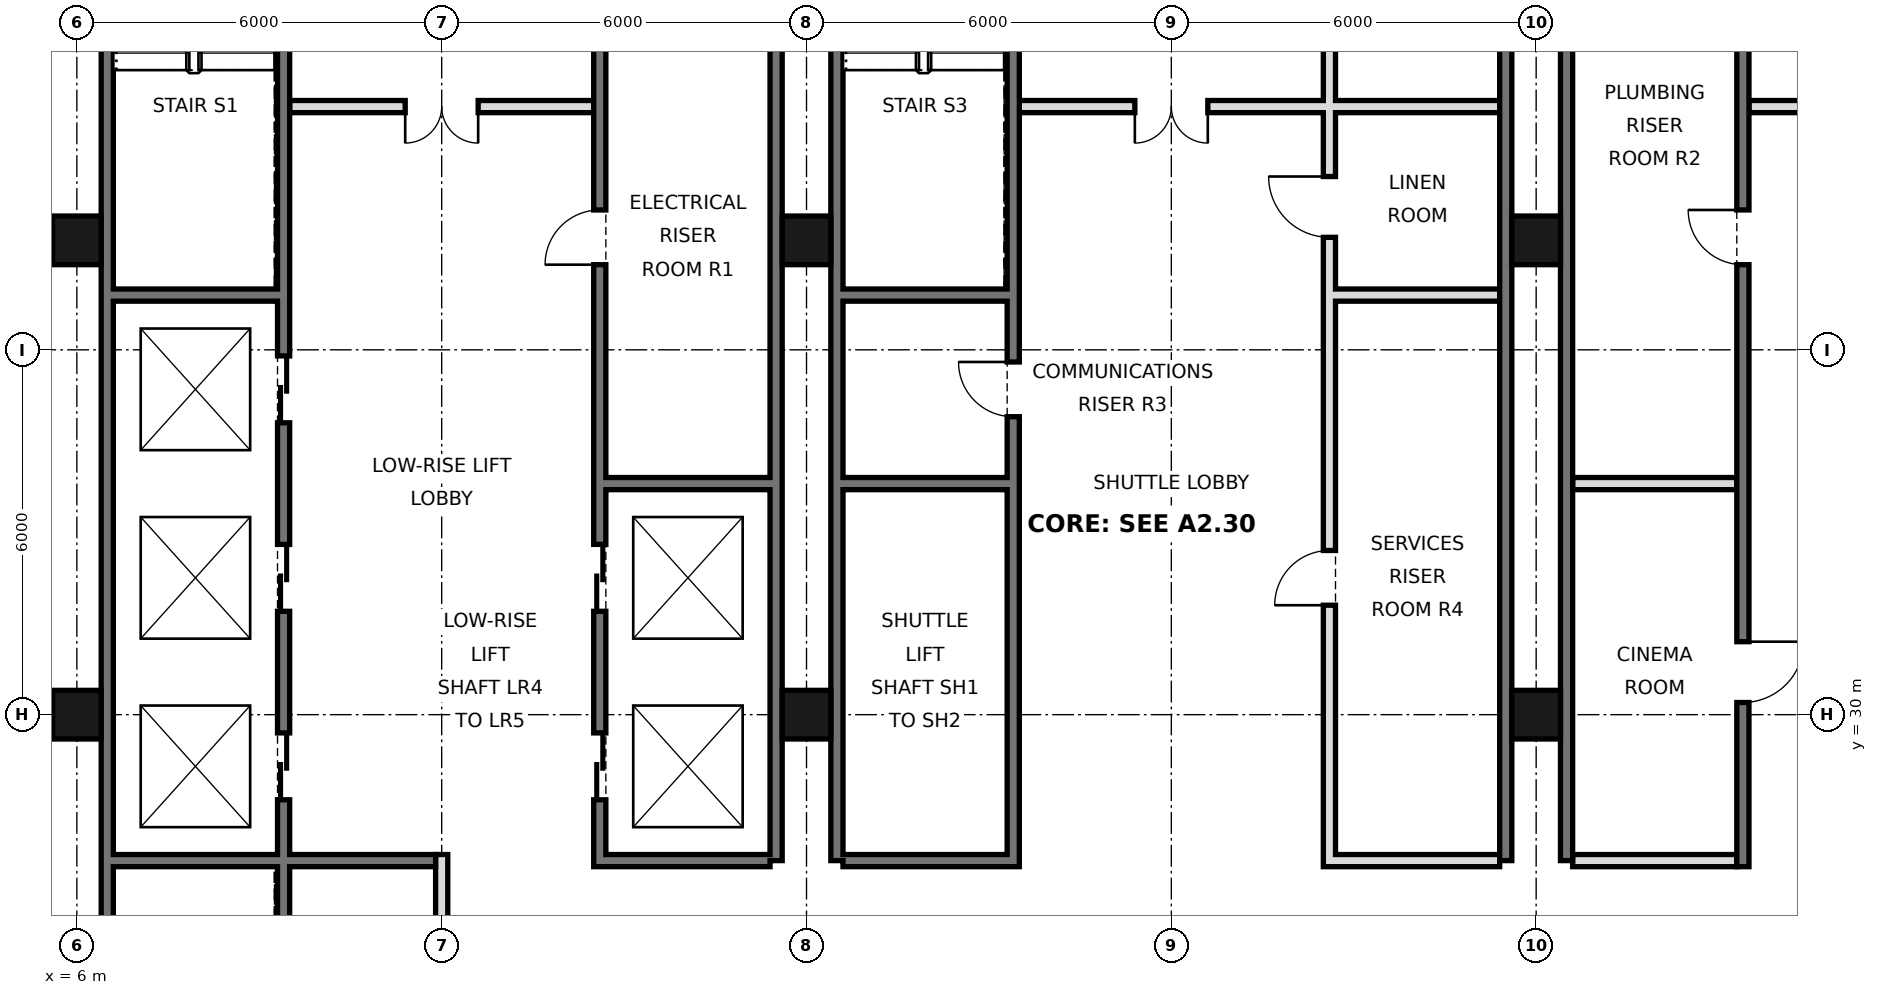
"""IFC4 building model, lengths in metres.
Left out: names, types, materials, properties, quantities, classifications, styles, units other than length and angle.
Written with IfcOpenShell. Run it as: python <this file> out.ifc"""

import sys

from ifc_helpers import new_model, si_unit, direction, frame, frame_2d, origin, origin_2d, place, context, subcontext, project, spatial, rectangle, hollow_rectangle, extrude, element, fill, save


model = new_model("IFC4")
c1 = context("Model", 3, precision=1e-05, world=origin(), true_north=direction((0.0, 1.0)))
c2 = subcontext(c1, "Body", "Model", "MODEL_VIEW")
j1 = project(units=[si_unit("LENGTHUNIT", "METRE"), si_unit("PLANEANGLEUNIT", "RADIAN")], contexts=[c1])
p1 = place(None, origin())
s1 = spatial("IfcSite", under=j1, at=p1, CompositionType="ELEMENT")
p2 = place(p1, origin())
s2 = spatial("IfcBuilding", under=s1, at=p2, CompositionType="ELEMENT")
p3 = place(p2, frame((0.0, 0.0, 119.6)))
s3 = spatial("IfcBuildingStorey", under=s2, at=p3, CompositionType="ELEMENT", Elevation=119.6)
for number, where, z_axis, x_axis in (
    (1, (6.0, 30.0, 0.0), (0.0, 0.0, 1.0), (1.0, 0.0, 0.0)),
    (2, (6.0, 37.8, 0.0), (0.0, 0.0, 1.0), (1.0, 0.0, 0.0)),
    (3, (18.0, 30.0, 0.0), (0.0, 0.0, 1.0), (1.0, 0.0, 0.0)),
    (4, (18.0, 37.8, 0.0), (0.0, 0.0, 1.0), (1.0, 0.0, 0.0)),
    (5, (30.0, 30.0, 0.0), (0.0, 0.0, 1.0), (1.0, 0.0, 0.0)),
    (6, (30.0, 37.8, 0.0), (0.0, 0.0, 1.0), (1.0, 0.0, 0.0)),
):
    element("IfcColumn", number, at=place(p3, frame(where, z_axis=z_axis, x_axis=x_axis)), inside=s3, PredefinedType="COLUMN", context=c2, shape_type="SweptSolid", body=[
        extrude(hollow_rectangle(XDim=0.8, YDim=0.8, WallThickness=0.05, at=origin_2d()), origin(), (0.0, 0.0, 1.0), 3.6),
    ])
p4 = place(p3, frame((6.5, 21.6, 0.0), z_axis=(0.0, 0.0, 1.0), x_axis=(0.0, 1.0, 0.0)))
e7 = element("IfcWall", 7, at=p4, inside=s3, PredefinedType="SOLIDWALL", context=c2, shape_type="SweptSolid", body=[
    extrude(rectangle(XDim=23.5, YDim=0.2, at=frame_2d((11.75, 0.0))), origin(), (0.0, 0.0, 1.0), 3.42),
])
for number, where, z_axis, x_axis in (
    (8, (17.5, 27.6, 0.0), (0.0, 0.0, 1.0), (0.0, 1.0, 0.0)),
    (9, (18.5, 27.6, 0.0), (0.0, 0.0, 1.0), (0.0, 1.0, 0.0)),
    (10, (29.5, 27.6, 0.0), (0.0, 0.0, 1.0), (0.0, 1.0, 0.0)),
    (11, (30.5, 27.6, 0.0), (0.0, 0.0, 1.0), (0.0, 1.0, 0.0)),
):
    element("IfcWall", number, at=place(p3, frame(where, z_axis=z_axis, x_axis=x_axis)), inside=s3, PredefinedType="SOLIDWALL", context=c2, shape_type="SweptSolid", body=[
        extrude(rectangle(XDim=17.5, YDim=0.2, at=frame_2d((8.75, 0.0))), origin(), (0.0, 0.0, 1.0), 3.42),
    ])
p5 = place(p3, frame((12.0, 21.6, 0.0), z_axis=(0.0, 0.0, 1.0), x_axis=(0.0, 1.0, 0.0)))
e12 = element("IfcWall", 12, at=p5, inside=s3, PredefinedType="PARTITIONING", context=c2, shape_type="SweptSolid", body=[
    extrude(rectangle(XDim=6.1, YDim=0.2, at=frame_2d((3.05, 0.0))), origin(), (0.0, 0.0, 1.0), 3.42),
])
p6 = place(p3, frame((14.6, 27.5, 0.0), z_axis=(0.0, 0.0, 1.0), x_axis=(0.0, 1.0, 0.0)))
e13 = element("IfcWall", 13, at=p6, inside=s3, PredefinedType="SOLIDWALL", context=c2, shape_type="SweptSolid", body=[
    extrude(rectangle(XDim=17.5, YDim=0.2, at=frame_2d((8.75, 0.0))), origin(), (0.0, 0.0, 1.0), 3.42),
])
p7 = place(p6, frame((1.1, 0.0, 0.0)))
e14 = element("IfcOpeningElement", 14, at=p7, cuts=e13, PredefinedType="OPENING", context=c2, shape_type="SweptSolid", body=[
    extrude(rectangle(XDim=1.1, YDim=2.1, at=frame_2d((0.55, 1.05))), frame((0.0, 0.11, 0.0), z_axis=(0.0, -1.0, 0.0), x_axis=(1.0, 0.0, 0.0)), (0.0, 0.0, 1.0), 0.22),
])
p8 = place(p6, frame((4.2, 0.0, 0.0)))
e15 = element("IfcOpeningElement", 15, at=p8, cuts=e13, PredefinedType="OPENING", context=c2, shape_type="SweptSolid", body=[
    extrude(rectangle(XDim=1.1, YDim=2.1, at=frame_2d((0.55, 1.05))), frame((0.0, 0.11, 0.0), z_axis=(0.0, -1.0, 0.0), x_axis=(1.0, 0.0, 0.0)), (0.0, 0.0, 1.0), 0.22),
])
p9 = place(p6, frame((15.4, 0.0, 0.0)))
e16 = element("IfcOpeningElement", 16, at=p9, cuts=e13, PredefinedType="OPENING", context=c2, shape_type="SweptSolid", body=[
    extrude(rectangle(XDim=1.1, YDim=2.1, at=frame_2d((0.55, 1.05))), frame((0.0, 0.11, 0.0), z_axis=(0.0, -1.0, 0.0), x_axis=(1.0, 0.0, 0.0)), (0.0, 0.0, 1.0), 0.22),
])
p10 = place(p6, frame((9.9, 0.0, 0.0)))
e17 = element("IfcOpeningElement", 17, at=p10, cuts=e13, PredefinedType="OPENING", context=c2, shape_type="SweptSolid", body=[
    extrude(rectangle(XDim=0.9, YDim=2.1, at=frame_2d((0.45, 1.05))), frame((0.0, 0.11, 0.0), z_axis=(0.0, -1.0, 0.0), x_axis=(1.0, 0.0, 0.0)), (0.0, 0.0, 1.0), 0.22),
])
p11 = place(p3, frame((21.4, 27.5, 0.0), z_axis=(0.0, 0.0, 1.0), x_axis=(0.0, 1.0, 0.0)))
e18 = element("IfcWall", 18, at=p11, inside=s3, PredefinedType="SOLIDWALL", context=c2, shape_type="SweptSolid", body=[
    extrude(rectangle(XDim=17.5, YDim=0.2, at=frame_2d((8.75, 0.0))), origin(), (0.0, 0.0, 1.0), 3.42),
])
p12 = place(p11, frame((16.2, 0.0, 0.0)))
e19 = element("IfcOpeningElement", 19, at=p12, cuts=e18, PredefinedType="OPENING", context=c2, shape_type="SweptSolid", body=[
    extrude(rectangle(XDim=1.0, YDim=2.1, at=frame_2d((0.5, 1.05))), frame((0.0, 0.11, 0.0), z_axis=(0.0, -1.0, 0.0), x_axis=(1.0, 0.0, 0.0)), (0.0, 0.0, 1.0), 0.22),
])
p13 = place(p11, frame((7.4, 0.0, 0.0)))
e20 = element("IfcOpeningElement", 20, at=p13, cuts=e18, PredefinedType="OPENING", context=c2, shape_type="SweptSolid", body=[
    extrude(rectangle(XDim=0.9, YDim=2.1, at=frame_2d((0.45, 1.05))), frame((0.0, 0.11, 0.0), z_axis=(0.0, -1.0, 0.0), x_axis=(1.0, 0.0, 0.0)), (0.0, 0.0, 1.0), 0.22),
])
p14 = place(p3, frame((26.6, 27.5, 0.0), z_axis=(0.0, 0.0, 1.0), x_axis=(0.0, 1.0, 0.0)))
e21 = element("IfcWall", 21, at=p14, inside=s3, PredefinedType="SOLIDWALL", context=c2, shape_type="SweptSolid", body=[
    extrude(rectangle(XDim=17.5, YDim=0.2, at=frame_2d((8.75, 0.0))), origin(), (0.0, 0.0, 1.0), 3.42),
])
p15 = place(p14, frame((4.3, 0.0, 0.0)))
e22 = element("IfcOpeningElement", 22, at=p15, cuts=e21, PredefinedType="OPENING", context=c2, shape_type="SweptSolid", body=[
    extrude(rectangle(XDim=0.9, YDim=2.1, at=frame_2d((0.45, 1.05))), frame((0.0, 0.11, 0.0), z_axis=(0.0, -1.0, 0.0), x_axis=(1.0, 0.0, 0.0)), (0.0, 0.0, 1.0), 0.22),
])
p16 = place(p14, frame((10.35, 0.0, 0.0)))
e23 = element("IfcOpeningElement", 23, at=p16, cuts=e21, PredefinedType="OPENING", context=c2, shape_type="SweptSolid", body=[
    extrude(rectangle(XDim=1.0, YDim=2.1, at=frame_2d((0.5, 1.05))), frame((0.0, 0.11, 0.0), z_axis=(0.0, -1.0, 0.0), x_axis=(1.0, 0.0, 0.0)), (0.0, 0.0, 1.0), 0.22),
])
p17 = place(p14, frame((14.575, 0.0, 0.0)))
e24 = element("IfcOpeningElement", 24, at=p17, cuts=e21, PredefinedType="OPENING", context=c2, shape_type="SweptSolid", body=[
    extrude(rectangle(XDim=1.0, YDim=2.1, at=frame_2d((0.5, 1.05))), frame((0.0, 0.11, 0.0), z_axis=(0.0, -1.0, 0.0), x_axis=(1.0, 0.0, 0.0)), (0.0, 0.0, 1.0), 0.22),
])
p18 = place(p3, frame((33.4, 27.5, 0.0), z_axis=(0.0, 0.0, 1.0), x_axis=(0.0, 1.0, 0.0)))
e25 = element("IfcWall", 25, at=p18, inside=s3, PredefinedType="SOLIDWALL", context=c2, shape_type="SweptSolid", body=[
    extrude(rectangle(XDim=17.5, YDim=0.2, at=frame_2d((8.75, 0.0))), origin(), (0.0, 0.0, 1.0), 3.42),
])
p19 = place(p18, frame((15.4, 0.0, 0.0)))
e26 = element("IfcOpeningElement", 26, at=p19, cuts=e25, PredefinedType="OPENING", context=c2, shape_type="SweptSolid", body=[
    extrude(rectangle(XDim=1.1, YDim=2.1, at=frame_2d((0.55, 1.05))), frame((0.0, 0.11, 0.0), z_axis=(0.0, -1.0, 0.0), x_axis=(1.0, 0.0, 0.0)), (0.0, 0.0, 1.0), 0.22),
])
p20 = place(p18, frame((2.7, 0.0, 0.0)))
e27 = element("IfcOpeningElement", 27, at=p20, cuts=e25, PredefinedType="OPENING", context=c2, shape_type="SweptSolid", body=[
    extrude(rectangle(XDim=1.0, YDim=2.1, at=frame_2d((0.5, 1.05))), frame((0.0, 0.11, 0.0), z_axis=(0.0, -1.0, 0.0), x_axis=(1.0, 0.0, 0.0)), (0.0, 0.0, 1.0), 0.22),
])
p21 = place(p18, frame((9.9, 0.0, 0.0)))
e28 = element("IfcOpeningElement", 28, at=p21, cuts=e25, PredefinedType="OPENING", context=c2, shape_type="SweptSolid", body=[
    extrude(rectangle(XDim=0.9, YDim=2.1, at=frame_2d((0.45, 1.05))), frame((0.0, 0.11, 0.0), z_axis=(0.0, -1.0, 0.0), x_axis=(1.0, 0.0, 0.0)), (0.0, 0.0, 1.0), 0.22),
])
p22 = place(p3, frame((9.4, 21.6, 0.0), z_axis=(0.0, 0.0, 1.0), x_axis=(0.0, 1.0, 0.0)))
e29 = element("IfcWall", 29, at=p22, inside=s3, PredefinedType="SOLIDWALL", context=c2, shape_type="SweptSolid", body=[
    extrude(rectangle(XDim=23.4, YDim=0.2, at=frame_2d((11.7, 0.0))), origin(), (0.0, 0.0, 1.0), 3.42),
])
p23 = place(p22, frame((7.0, 0.0, 0.0)))
e30 = element("IfcOpeningElement", 30, at=p23, cuts=e29, PredefinedType="OPENING", context=c2, shape_type="SweptSolid", body=[
    extrude(rectangle(XDim=1.1, YDim=2.1, at=frame_2d((0.55, 1.05))), frame((0.0, 0.11, 0.0), z_axis=(0.0, -1.0, 0.0), x_axis=(1.0, 0.0, 0.0)), (0.0, 0.0, 1.0), 0.22),
])
p24 = place(p22, frame((10.1, 0.0, 0.0)))
e31 = element("IfcOpeningElement", 31, at=p24, cuts=e29, PredefinedType="OPENING", context=c2, shape_type="SweptSolid", body=[
    extrude(rectangle(XDim=1.1, YDim=2.1, at=frame_2d((0.55, 1.05))), frame((0.0, 0.11, 0.0), z_axis=(0.0, -1.0, 0.0), x_axis=(1.0, 0.0, 0.0)), (0.0, 0.0, 1.0), 0.22),
])
p25 = place(p22, frame((13.2, 0.0, 0.0)))
e32 = element("IfcOpeningElement", 32, at=p25, cuts=e29, PredefinedType="OPENING", context=c2, shape_type="SweptSolid", body=[
    extrude(rectangle(XDim=1.1, YDim=2.1, at=frame_2d((0.55, 1.05))), frame((0.0, 0.11, 0.0), z_axis=(0.0, -1.0, 0.0), x_axis=(1.0, 0.0, 0.0)), (0.0, 0.0, 1.0), 0.22),
])
p26 = place(p22, frame((22.1, 0.0, 0.0)))
e33 = element("IfcOpeningElement", 33, at=p26, cuts=e29, PredefinedType="OPENING", context=c2, shape_type="SweptSolid", body=[
    extrude(rectangle(XDim=1.0, YDim=2.1, at=frame_2d((0.5, 1.05))), frame((0.0, 0.11, 0.0), z_axis=(0.0, -1.0, 0.0), x_axis=(1.0, 0.0, 0.0)), (0.0, 0.0, 1.0), 0.22),
])
p27 = place(p22, frame((0.175, 0.0, 0.0)))
e34 = element("IfcOpeningElement", 34, at=p27, cuts=e29, PredefinedType="OPENING", context=c2, shape_type="SweptSolid", body=[
    extrude(rectangle(XDim=0.9, YDim=2.1, at=frame_2d((0.45, 1.05))), frame((0.0, 0.11, 0.0), z_axis=(0.0, -1.0, 0.0), x_axis=(1.0, 0.0, 0.0)), (0.0, 0.0, 1.0), 0.22),
])
for number, where, z_axis, x_axis in (
    (35, (14.7, 27.6, 0.0), (0.0, 0.0, 1.0), (1.0, 0.0, 0.0)),
    (36, (18.6, 27.6, 0.0), (0.0, 0.0, 1.0), (1.0, 0.0, 0.0)),
    (37, (26.7, 27.6, 0.0), (0.0, 0.0, 1.0), (1.0, 0.0, 0.0)),
):
    element("IfcWall", number, at=place(p3, frame(where, z_axis=z_axis, x_axis=x_axis)), inside=s3, PredefinedType="SOLIDWALL", context=c2, shape_type="SweptSolid", body=[
        extrude(rectangle(XDim=2.7, YDim=0.2, at=frame_2d((1.35, 0.0))), origin(), (0.0, 0.0, 1.0), 3.42),
    ])
p28 = place(p3, frame((30.6, 27.6, 0.0), z_axis=(0.0, 0.0, 1.0), x_axis=(1.0, 0.0, 0.0)))
e38 = element("IfcWall", 38, at=p28, inside=s3, PredefinedType="PARTITIONING", context=c2, shape_type="SweptSolid", body=[
    extrude(rectangle(XDim=2.7, YDim=0.2, at=frame_2d((1.35, 0.0))), origin(), (0.0, 0.0, 1.0), 3.42),
])
p29 = place(p3, frame((6.6, 27.6, 0.0), z_axis=(0.0, 0.0, 1.0), x_axis=(1.0, 0.0, 0.0)))
e39 = element("IfcWall", 39, at=p29, inside=s3, PredefinedType="SOLIDWALL", context=c2, shape_type="SweptSolid", body=[
    extrude(rectangle(XDim=5.3, YDim=0.2, at=frame_2d((2.65, 0.0))), origin(), (0.0, 0.0, 1.0), 3.42),
])
for number, where, z_axis, x_axis in (
    (40, (14.7, 33.8, 0.0), (0.0, 0.0, 1.0), (1.0, 0.0, 0.0)),
    (41, (18.6, 33.8, 0.0), (0.0, 0.0, 1.0), (1.0, 0.0, 0.0)),
    (42, (30.6, 33.8, 0.0), (0.0, 0.0, 1.0), (1.0, 0.0, 0.0)),
    (43, (18.6, 36.9, 0.0), (0.0, 0.0, 1.0), (1.0, 0.0, 0.0)),
    (44, (26.7, 36.9, 0.0), (0.0, 0.0, 1.0), (1.0, 0.0, 0.0)),
    (45, (6.6, 36.9, 0.0), (0.0, 0.0, 1.0), (1.0, 0.0, 0.0)),
):
    element("IfcWall", number, at=place(p3, frame(where, z_axis=z_axis, x_axis=x_axis)), inside=s3, PredefinedType="SOLIDWALL", context=c2, shape_type="SweptSolid", body=[
        extrude(rectangle(XDim=2.7, YDim=0.2, at=frame_2d((1.35, 0.0))), origin(), (0.0, 0.0, 1.0), 3.42),
    ])
p30 = place(p3, frame((21.5, 40.0, 0.0), z_axis=(0.0, 0.0, 1.0), x_axis=(1.0, 0.0, 0.0)))
e46 = element("IfcWall", 46, at=p30, inside=s3, PredefinedType="PARTITIONING", context=c2, shape_type="SweptSolid", body=[
    extrude(rectangle(XDim=7.9, YDim=0.2, at=frame_2d((3.95, 0.0))), origin(), (0.0, 0.0, 1.0), 3.42),
])
p31 = place(p30, frame((1.9, 0.0, 0.0)))
e47 = element("IfcOpeningElement", 47, at=p31, cuts=e46, PredefinedType="OPENING", context=c2, shape_type="SweptSolid", body=[
    extrude(rectangle(XDim=1.2, YDim=2.1, at=frame_2d((0.6, 1.05))), frame((0.0, 0.11, 0.0), z_axis=(0.0, -1.0, 0.0), x_axis=(1.0, 0.0, 0.0)), (0.0, 0.0, 1.0), 0.22),
])
p32 = place(p3, frame((33.5, 40.0, 0.0), z_axis=(0.0, 0.0, 1.0), x_axis=(1.0, 0.0, 0.0)))
e48 = element("IfcWall", 48, at=p32, inside=s3, PredefinedType="PARTITIONING", context=c2, shape_type="SweptSolid", body=[
    extrude(rectangle(XDim=5.0, YDim=0.2, at=frame_2d((2.5, 0.0))), origin(), (0.0, 0.0, 1.0), 3.42),
])
p33 = place(p32, frame((1.9, 0.0, 0.0)))
e49 = element("IfcOpeningElement", 49, at=p33, cuts=e48, PredefinedType="OPENING", context=c2, shape_type="SweptSolid", body=[
    extrude(rectangle(XDim=1.2, YDim=2.1, at=frame_2d((0.6, 1.05))), frame((0.0, 0.11, 0.0), z_axis=(0.0, -1.0, 0.0), x_axis=(1.0, 0.0, 0.0)), (0.0, 0.0, 1.0), 0.22),
])
p34 = place(p3, frame((9.5, 40.0, 0.0), z_axis=(0.0, 0.0, 1.0), x_axis=(1.0, 0.0, 0.0)))
e50 = element("IfcWall", 50, at=p34, inside=s3, PredefinedType="PARTITIONING", context=c2, shape_type="SweptSolid", body=[
    extrude(rectangle(XDim=5.0, YDim=0.2, at=frame_2d((2.5, 0.0))), origin(), (0.0, 0.0, 1.0), 3.42),
])
p35 = place(p34, frame((1.9, 0.0, 0.0)))
e51 = element("IfcOpeningElement", 51, at=p35, cuts=e50, PredefinedType="OPENING", context=c2, shape_type="SweptSolid", body=[
    extrude(rectangle(XDim=1.2, YDim=2.1, at=frame_2d((0.6, 1.05))), frame((0.0, 0.11, 0.0), z_axis=(0.0, -1.0, 0.0), x_axis=(1.0, 0.0, 0.0)), (0.0, 0.0, 1.0), 0.22),
])
p36 = place(p35, frame((1.2, 0.0, 0.0), z_axis=(0.0, 0.0, 1.0), x_axis=(-1.0, 0.0, 0.0)))
e52 = element("IfcDoor", 52, at=p36, inside=s3, OperationType="DOUBLE_DOOR_SINGLE_SWING", PredefinedType="DOOR", context=c2, shape_type="SweptSolid", body=[
    extrude(rectangle(XDim=1.2, YDim=2.1, at=frame_2d((0.6, 1.05))), frame((0.0, 0.025, 0.0), z_axis=(0.0, -1.0, 0.0), x_axis=(1.0, 0.0, 0.0)), (0.0, 0.0, 1.0), 0.05),
])
fill(e51, e52)
p37 = place(p31, frame((1.2, 0.0, 0.0), z_axis=(0.0, 0.0, 1.0), x_axis=(-1.0, 0.0, 0.0)))
e53 = element("IfcDoor", 53, at=p37, inside=s3, OperationType="DOUBLE_DOOR_SINGLE_SWING", PredefinedType="DOOR", context=c2, shape_type="SweptSolid", body=[
    extrude(rectangle(XDim=1.2, YDim=2.1, at=frame_2d((0.6, 1.05))), frame((0.0, 0.025, 0.0), z_axis=(0.0, -1.0, 0.0), x_axis=(1.0, 0.0, 0.0)), (0.0, 0.0, 1.0), 0.05),
])
fill(e47, e53)
p38 = place(p7, origin())
e54 = element("IfcDoor", 54, at=p38, inside=s3, OperationType="DOUBLE_DOOR_SLIDING", PredefinedType="DOOR", context=c2, shape_type="SweptSolid", body=[
    extrude(rectangle(XDim=1.1, YDim=2.1, at=frame_2d((0.55, 1.05))), frame((0.0, 0.025, 0.0), z_axis=(0.0, -1.0, 0.0), x_axis=(1.0, 0.0, 0.0)), (0.0, 0.0, 1.0), 0.05),
])
fill(e14, e54)
p39 = place(p8, origin())
e55 = element("IfcDoor", 55, at=p39, inside=s3, OperationType="DOUBLE_DOOR_SLIDING", PredefinedType="DOOR", context=c2, shape_type="SweptSolid", body=[
    extrude(rectangle(XDim=1.1, YDim=2.1, at=frame_2d((0.55, 1.05))), frame((0.0, 0.025, 0.0), z_axis=(0.0, -1.0, 0.0), x_axis=(1.0, 0.0, 0.0)), (0.0, 0.0, 1.0), 0.05),
])
fill(e15, e55)
p40 = place(p23, origin())
e56 = element("IfcDoor", 56, at=p40, inside=s3, OperationType="DOUBLE_DOOR_SLIDING", PredefinedType="DOOR", context=c2, shape_type="SweptSolid", body=[
    extrude(rectangle(XDim=1.1, YDim=2.1, at=frame_2d((0.55, 1.05))), frame((0.0, 0.025, 0.0), z_axis=(0.0, -1.0, 0.0), x_axis=(1.0, 0.0, 0.0)), (0.0, 0.0, 1.0), 0.05),
])
fill(e30, e56)
p41 = place(p24, origin())
e57 = element("IfcDoor", 57, at=p41, inside=s3, OperationType="DOUBLE_DOOR_SLIDING", PredefinedType="DOOR", context=c2, shape_type="SweptSolid", body=[
    extrude(rectangle(XDim=1.1, YDim=2.1, at=frame_2d((0.55, 1.05))), frame((0.0, 0.025, 0.0), z_axis=(0.0, -1.0, 0.0), x_axis=(1.0, 0.0, 0.0)), (0.0, 0.0, 1.0), 0.05),
])
fill(e31, e57)
p42 = place(p25, origin())
e58 = element("IfcDoor", 58, at=p42, inside=s3, OperationType="DOUBLE_DOOR_SLIDING", PredefinedType="DOOR", context=c2, shape_type="SweptSolid", body=[
    extrude(rectangle(XDim=1.1, YDim=2.1, at=frame_2d((0.55, 1.05))), frame((0.0, 0.025, 0.0), z_axis=(0.0, -1.0, 0.0), x_axis=(1.0, 0.0, 0.0)), (0.0, 0.0, 1.0), 0.05),
])
fill(e32, e58)
p43 = place(p20, origin())
e59 = element("IfcDoor", 59, at=p43, inside=s3, OperationType="SINGLE_SWING_RIGHT", PredefinedType="DOOR", context=c2, shape_type="SweptSolid", body=[
    extrude(rectangle(XDim=1.0, YDim=2.1, at=frame_2d((0.5, 1.05))), frame((0.0, 0.025, 0.0), z_axis=(0.0, -1.0, 0.0), x_axis=(1.0, 0.0, 0.0)), (0.0, 0.0, 1.0), 0.05),
])
fill(e27, e59)
p44 = place(p10, origin())
e60 = element("IfcDoor", 60, at=p44, inside=s3, OperationType="SINGLE_SWING_LEFT", PredefinedType="DOOR", context=c2, shape_type="SweptSolid", body=[
    extrude(rectangle(XDim=0.9, YDim=2.1, at=frame_2d((0.45, 1.05))), frame((0.0, 0.025, 0.0), z_axis=(0.0, -1.0, 0.0), x_axis=(1.0, 0.0, 0.0)), (0.0, 0.0, 1.0), 0.05),
])
fill(e17, e60)
p45 = place(p21, frame((0.9, 0.0, 0.0), z_axis=(0.0, 0.0, 1.0), x_axis=(-1.0, 0.0, 0.0)))
e61 = element("IfcDoor", 61, at=p45, inside=s3, OperationType="SINGLE_SWING_LEFT", PredefinedType="DOOR", context=c2, shape_type="SweptSolid", body=[
    extrude(rectangle(XDim=0.9, YDim=2.1, at=frame_2d((0.45, 1.05))), frame((0.0, 0.025, 0.0), z_axis=(0.0, -1.0, 0.0), x_axis=(1.0, 0.0, 0.0)), (0.0, 0.0, 1.0), 0.05),
])
fill(e28, e61)
p46 = place(p13, frame((0.9, 0.0, 0.0), z_axis=(0.0, 0.0, 1.0), x_axis=(-1.0, 0.0, 0.0)))
e62 = element("IfcDoor", 62, at=p46, inside=s3, OperationType="SINGLE_SWING_LEFT", PredefinedType="DOOR", context=c2, shape_type="SweptSolid", body=[
    extrude(rectangle(XDim=0.9, YDim=2.1, at=frame_2d((0.45, 1.05))), frame((0.0, 0.025, 0.0), z_axis=(0.0, -1.0, 0.0), x_axis=(1.0, 0.0, 0.0)), (0.0, 0.0, 1.0), 0.05),
])
fill(e20, e62)
p47 = place(p15, origin())
e63 = element("IfcDoor", 63, at=p47, inside=s3, OperationType="SINGLE_SWING_LEFT", PredefinedType="DOOR", context=c2, shape_type="SweptSolid", body=[
    extrude(rectangle(XDim=0.9, YDim=2.1, at=frame_2d((0.45, 1.05))), frame((0.0, 0.025, 0.0), z_axis=(0.0, -1.0, 0.0), x_axis=(1.0, 0.0, 0.0)), (0.0, 0.0, 1.0), 0.05),
])
fill(e22, e63)
p48 = place(p16, frame((1.0, 0.0, 0.0), z_axis=(0.0, 0.0, 1.0), x_axis=(-1.0, 0.0, 0.0)))
e64 = element("IfcDoor", 64, at=p48, inside=s3, OperationType="SINGLE_SWING_LEFT", PredefinedType="DOOR", context=c2, shape_type="SweptSolid", body=[
    extrude(rectangle(XDim=1.0, YDim=2.1, at=frame_2d((0.5, 1.05))), frame((0.0, 0.025, 0.0), z_axis=(0.0, -1.0, 0.0), x_axis=(1.0, 0.0, 0.0)), (0.0, 0.0, 1.0), 0.05),
])
fill(e23, e64)
save(model, sys.argv[1])
